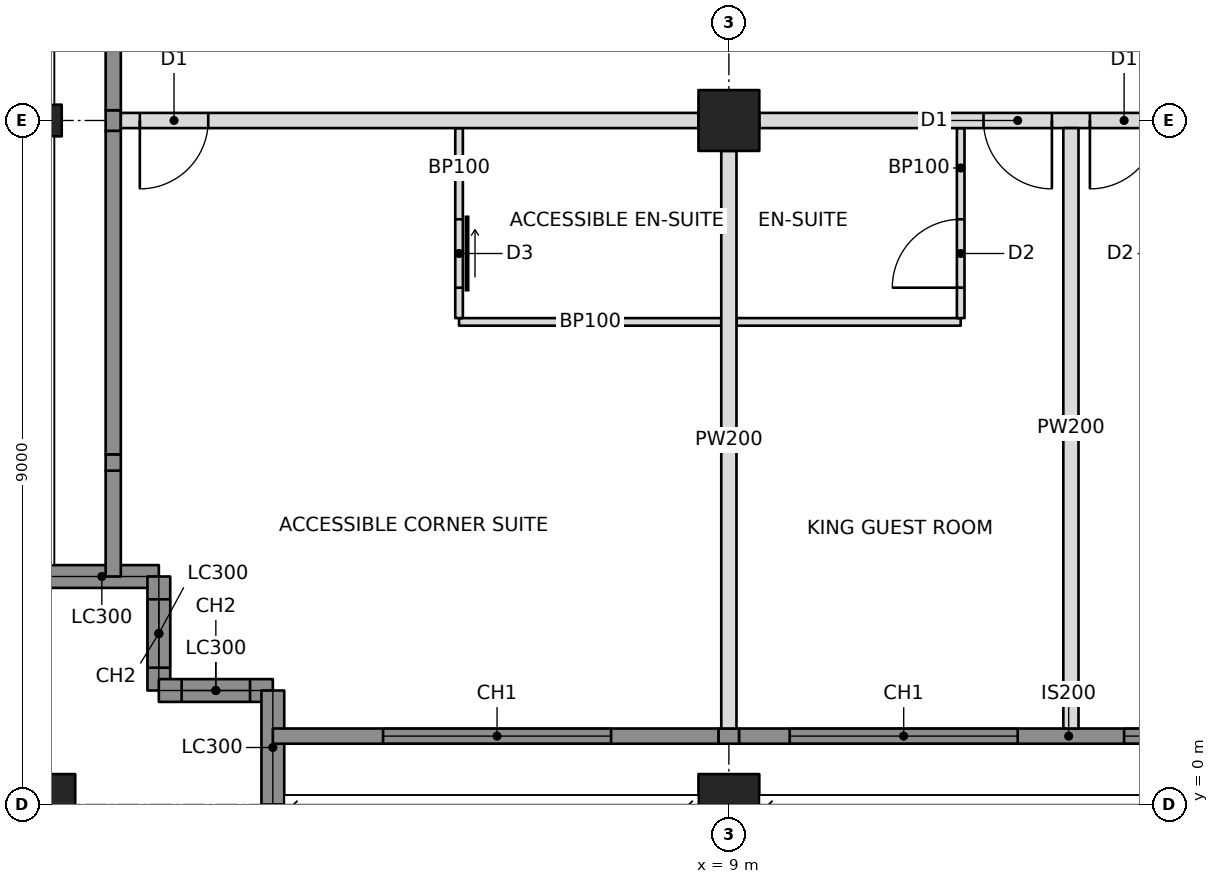
"""IFC4 building model, lengths in metres.
Left out: names, types, materials, properties, quantities, classifications, styles, units other than length and angle.
Written with IfcOpenShell. Run it as: python <this file> out.ifc"""

import sys

from ifc_helpers import new_model, si_unit, direction, frame, frame_2d, origin, origin_with_axes, origin_2d, place, context, subcontext, project, spatial, rectangle, hollow_rectangle, i_section, extrude, element, fill, save


model = new_model("IFC4")
c1 = context("Model", 3, precision=1e-05, world=origin(), true_north=direction((0.0, 1.0)))
c2 = subcontext(c1, "Body", "Model", "MODEL_VIEW")
j1 = project(units=[si_unit("LENGTHUNIT", "METRE"), si_unit("PLANEANGLEUNIT", "RADIAN")], contexts=[c1])
p1 = place(None, origin())
s1 = spatial("IfcSite", under=j1, at=p1, CompositionType="ELEMENT")
p2 = place(p1, origin())
s2 = spatial("IfcBuilding", under=s1, at=p2, CompositionType="ELEMENT")
p3 = place(p2, frame((0.0, 0.0, 251.8)))
s3 = spatial("IfcBuildingStorey", under=s2, at=p3, CompositionType="ELEMENT", Elevation=251.8)
p4 = place(p3, origin_with_axes())
e1 = element("IfcColumn", 1, at=p4, inside=s3, PredefinedType="COLUMN", context=c2, shape_type="SweptSolid", body=[
    extrude(hollow_rectangle(XDim=0.8, YDim=0.8, WallThickness=0.032, at=origin_2d()), origin(), (0.0, 0.0, 1.0), 3.6),
])
p5 = place(p3, frame((0.0, 9.0, 0.0), z_axis=(0.0, 0.0, 1.0), x_axis=(0.0, 1.0, 0.0)))
e2 = element("IfcColumn", 2, at=p5, inside=s3, PredefinedType="COLUMN", context=c2, shape_type="SweptSolid", body=[
    extrude(i_section(OverallWidth=0.417, OverallDepth=0.445, WebThickness=0.039, FlangeThickness=0.063, at=origin_2d()), origin(), (0.0, 0.0, 1.0), 3.6),
])
for number, where, z_axis, x_axis in (
    (3, (9.0, 0.0, 0.0), (0.0, 0.0, 1.0), (1.0, 0.0, 0.0)),
    (4, (9.0, 9.0, 0.0), (0.0, 0.0, 1.0), (1.0, 0.0, 0.0)),
):
    element("IfcColumn", number, at=place(p3, frame(where, z_axis=z_axis, x_axis=x_axis)), inside=s3, PredefinedType="COLUMN", context=c2, shape_type="SweptSolid", body=[
        extrude(hollow_rectangle(XDim=0.8, YDim=0.8, WallThickness=0.032, at=origin_2d()), origin(), (0.0, 0.0, 1.0), 3.6),
    ])
p6 = place(p3, frame((0.0, 3.0, 0.0), z_axis=(0.0, 0.0, 1.0), x_axis=(1.0, 0.0, 0.0)))
e5 = element("IfcWall", 5, at=p6, inside=s3, PredefinedType="SOLIDWALL", context=c2, shape_type="SweptSolid", body=[
    extrude(rectangle(XDim=1.5, YDim=0.3, at=frame_2d((0.75, 0.0))), origin(), (0.0, 0.0, 1.0), 2.62),
])
p7 = place(p3, frame((1.5, 3.0, 0.0), z_axis=(0.0, 0.0, 1.0), x_axis=(0.0, -1.0, 0.0)))
e6 = element("IfcWall", 6, at=p7, inside=s3, PredefinedType="SOLIDWALL", context=c2, shape_type="SweptSolid", body=[
    extrude(rectangle(XDim=1.5, YDim=0.3, at=frame_2d((0.75, 0.0))), origin(), (0.0, 0.0, 1.0), 3.4),
])
p8 = place(p7, frame((0.3, 0.0, 0.6)))
e7 = element("IfcOpeningElement", 7, at=p8, cuts=e6, PredefinedType="OPENING", context=c2, shape_type="SweptSolid", body=[
    extrude(rectangle(XDim=0.9, YDim=2.2, at=frame_2d((0.45, 1.1))), frame((0.0, 0.16, 0.0), z_axis=(0.0, -1.0, 0.0), x_axis=(1.0, 0.0, 0.0)), (0.0, 0.0, 1.0), 0.32),
])
p9 = place(p3, frame((1.5, 1.5, 0.0), z_axis=(0.0, 0.0, 1.0), x_axis=(1.0, 0.0, 0.0)))
e8 = element("IfcWall", 8, at=p9, inside=s3, PredefinedType="SOLIDWALL", context=c2, shape_type="SweptSolid", body=[
    extrude(rectangle(XDim=1.5, YDim=0.3, at=frame_2d((0.75, 0.0))), origin(), (0.0, 0.0, 1.0), 3.4),
])
p10 = place(p9, frame((0.3, 0.0, 0.6)))
e9 = element("IfcOpeningElement", 9, at=p10, cuts=e8, PredefinedType="OPENING", context=c2, shape_type="SweptSolid", body=[
    extrude(rectangle(XDim=0.9, YDim=2.2, at=frame_2d((0.45, 1.1))), frame((0.0, 0.16, 0.0), z_axis=(0.0, -1.0, 0.0), x_axis=(1.0, 0.0, 0.0)), (0.0, 0.0, 1.0), 0.32),
])
p11 = place(p3, frame((3.0, 1.5, 0.0), z_axis=(0.0, 0.0, 1.0), x_axis=(0.0, -1.0, 0.0)))
e10 = element("IfcWall", 10, at=p11, inside=s3, PredefinedType="SOLIDWALL", context=c2, shape_type="SweptSolid", body=[
    extrude(rectangle(XDim=1.5, YDim=0.3, at=frame_2d((0.75, 0.0))), origin(), (0.0, 0.0, 1.0), 2.62),
])
p12 = place(p3, frame((3.0, 0.9, 0.0), z_axis=(0.0, 0.0, 1.0), x_axis=(1.0, 0.0, 0.0)))
e11 = element("IfcWall", 11, at=p12, inside=s3, PredefinedType="SOLIDWALL", context=c2, shape_type="SweptSolid", body=[
    extrude(rectangle(XDim=5.865, YDim=0.2, at=frame_2d((2.932, 0.0))), origin(), (0.0, 0.0, 1.0), 3.4),
])
p13 = place(p12, frame((1.45, 0.0, 0.6)))
e12 = element("IfcOpeningElement", 12, at=p13, cuts=e11, PredefinedType="OPENING", context=c2, shape_type="SweptSolid", body=[
    extrude(rectangle(XDim=3.0, YDim=2.2, at=frame_2d((1.5, 1.1))), frame((0.0, 0.11, 0.0), z_axis=(0.0, -1.0, 0.0), x_axis=(1.0, 0.0, 0.0)), (0.0, 0.0, 1.0), 0.22),
])
p14 = place(p3, frame((0.9, 3.0, 0.0), z_axis=(0.0, 0.0, 1.0), x_axis=(0.0, 1.0, 0.0)))
e13 = element("IfcWall", 13, at=p14, inside=s3, PredefinedType="SOLIDWALL", context=c2, shape_type="SweptSolid", body=[
    extrude(rectangle(XDim=1.393, YDim=0.2, at=frame_2d((0.696, 0.0))), origin(), (0.0, 0.0, 1.0), 3.4),
])
p15 = place(p3, frame((1.0, 9.0, 0.0), z_axis=(0.0, 0.0, 1.0), x_axis=(1.0, 0.0, 0.0)))
e14 = element("IfcWall", 14, at=p15, inside=s3, PredefinedType="PARTITIONING", context=c2, shape_type="SweptSolid", body=[
    extrude(rectangle(XDim=7.6, YDim=0.2, at=frame_2d((3.8, 0.0))), origin(), (0.0, 0.0, 1.0), 2.638),
])
p16 = place(p15, frame((0.25, 0.0, 0.0)))
e15 = element("IfcOpeningElement", 15, at=p16, cuts=e14, PredefinedType="OPENING", context=c2, shape_type="SweptSolid", body=[
    extrude(rectangle(XDim=0.9, YDim=2.1, at=frame_2d((0.45, 1.05))), frame((0.0, 0.11, 0.0), z_axis=(0.0, -1.0, 0.0), x_axis=(1.0, 0.0, 0.0)), (0.0, 0.0, 1.0), 0.22),
])
p17 = place(p3, frame((9.4, 9.0, 0.0), z_axis=(0.0, 0.0, 1.0), x_axis=(1.0, 0.0, 0.0)))
e16 = element("IfcWall", 16, at=p17, inside=s3, PredefinedType="PARTITIONING", context=c2, shape_type="SweptSolid", body=[
    extrude(rectangle(XDim=8.2, YDim=0.2, at=frame_2d((4.1, 0.0))), origin(), (0.0, 0.0, 1.0), 2.605),
])
p18 = place(p17, frame((2.95, 0.0, 0.0)))
e17 = element("IfcOpeningElement", 17, at=p18, cuts=e16, PredefinedType="OPENING", context=c2, shape_type="SweptSolid", body=[
    extrude(rectangle(XDim=0.9, YDim=2.1, at=frame_2d((0.45, 1.05))), frame((0.0, 0.11, 0.0), z_axis=(0.0, -1.0, 0.0), x_axis=(1.0, 0.0, 0.0)), (0.0, 0.0, 1.0), 0.22),
])
p19 = place(p17, frame((4.35, 0.0, 0.0)))
e18 = element("IfcOpeningElement", 18, at=p19, cuts=e16, PredefinedType="OPENING", context=c2, shape_type="SweptSolid", body=[
    extrude(rectangle(XDim=0.9, YDim=2.1, at=frame_2d((0.45, 1.05))), frame((0.0, 0.11, 0.0), z_axis=(0.0, -1.0, 0.0), x_axis=(1.0, 0.0, 0.0)), (0.0, 0.0, 1.0), 0.22),
])
p20 = place(p3, frame((9.0, 8.6, 0.0), z_axis=(0.0, 0.0, 1.0), x_axis=(0.0, -1.0, 0.0)))
e19 = element("IfcWall", 19, at=p20, inside=s3, PredefinedType="PARTITIONING", context=c2, shape_type="SweptSolid", body=[
    extrude(rectangle(XDim=7.6, YDim=0.2, at=frame_2d((3.8, 0.0))), origin(), (0.0, 0.0, 1.0), 2.638),
])
p21 = place(p3, frame((13.5, 8.9, 0.0), z_axis=(0.0, 0.0, 1.0), x_axis=(0.0, -1.0, 0.0)))
e20 = element("IfcWall", 20, at=p21, inside=s3, PredefinedType="PARTITIONING", context=c2, shape_type="SweptSolid", body=[
    extrude(rectangle(XDim=7.9, YDim=0.2, at=frame_2d((3.95, 0.0))), origin(), (0.0, 0.0, 1.0), 2.604),
])
p22 = place(p3, frame((5.45, 6.35, 0.0), z_axis=(0.0, 0.0, 1.0), x_axis=(1.0, 0.0, 0.0)))
e21 = element("IfcWall", 21, at=p22, inside=s3, PredefinedType="PARTITIONING", context=c2, shape_type="SweptSolid", body=[
    extrude(rectangle(XDim=3.45, YDim=0.1, at=frame_2d((1.725, 0.0))), origin(), (0.0, 0.0, 1.0), 2.638),
])
p23 = place(p3, frame((5.45, 8.9, 0.0), z_axis=(0.0, 0.0, 1.0), x_axis=(0.0, -1.0, 0.0)))
e22 = element("IfcWall", 22, at=p23, inside=s3, PredefinedType="PARTITIONING", context=c2, shape_type="SweptSolid", body=[
    extrude(rectangle(XDim=2.5, YDim=0.1, at=frame_2d((1.25, 0.0))), origin(), (0.0, 0.0, 1.0), 2.638),
])
p24 = place(p23, frame((1.2, 0.0, 0.0)))
e23 = element("IfcOpeningElement", 23, at=p24, cuts=e22, PredefinedType="OPENING", context=c2, shape_type="SweptSolid", body=[
    extrude(rectangle(XDim=0.9, YDim=2.1, at=frame_2d((0.45, 1.05))), frame((0.0, 0.06, 0.0), z_axis=(0.0, -1.0, 0.0), x_axis=(1.0, 0.0, 0.0)), (0.0, 0.0, 1.0), 0.12),
])
p25 = place(p3, frame((9.1, 6.35, 0.0), z_axis=(0.0, 0.0, 1.0), x_axis=(1.0, 0.0, 0.0)))
e24 = element("IfcWall", 24, at=p25, inside=s3, PredefinedType="PARTITIONING", context=c2, shape_type="SweptSolid", body=[
    extrude(rectangle(XDim=2.95, YDim=0.1, at=frame_2d((1.475, 0.0))), origin(), (0.0, 0.0, 1.0), 2.638),
])
p26 = place(p3, frame((12.05, 8.9, 0.0), z_axis=(0.0, 0.0, 1.0), x_axis=(0.0, -1.0, 0.0)))
e25 = element("IfcWall", 25, at=p26, inside=s3, PredefinedType="PARTITIONING", context=c2, shape_type="SweptSolid", body=[
    extrude(rectangle(XDim=2.5, YDim=0.1, at=frame_2d((1.25, 0.0))), origin(), (0.0, 0.0, 1.0), 2.604),
])
p27 = place(p26, frame((1.2, 0.0, 0.0)))
e26 = element("IfcOpeningElement", 26, at=p27, cuts=e25, PredefinedType="OPENING", context=c2, shape_type="SweptSolid", body=[
    extrude(rectangle(XDim=0.9, YDim=2.1, at=frame_2d((0.45, 1.05))), frame((0.0, 0.06, 0.0), z_axis=(0.0, -1.0, 0.0), x_axis=(1.0, 0.0, 0.0)), (0.0, 0.0, 1.0), 0.12),
])
p28 = place(p3, frame((8.865, 0.9, 0.0), z_axis=(0.0, 0.0, 1.0), x_axis=(1.0, 0.0, 0.0)))
e27 = element("IfcWall", 27, at=p28, inside=s3, PredefinedType="SOLIDWALL", context=c2, shape_type="SweptSolid", body=[
    extrude(rectangle(XDim=0.271, YDim=0.2, at=frame_2d((0.135, 0.0))), origin(), (0.0, 0.0, 1.0), 2.638),
])
p29 = place(p3, frame((9.135, 0.9, 0.0), z_axis=(0.0, 0.0, 1.0), x_axis=(1.0, 0.0, 0.0)))
e28 = element("IfcWall", 28, at=p29, inside=s3, PredefinedType="SOLIDWALL", context=c2, shape_type="SweptSolid", body=[
    extrude(rectangle(XDim=8.671, YDim=0.2, at=frame_2d((4.335, 0.0))), origin(), (0.0, 0.0, 1.0), 3.4),
])
p30 = place(p29, frame((0.665, 0.0, 0.6)))
e29 = element("IfcOpeningElement", 29, at=p30, cuts=e28, PredefinedType="OPENING", context=c2, shape_type="SweptSolid", body=[
    extrude(rectangle(XDim=3.0, YDim=2.2, at=frame_2d((1.5, 1.1))), frame((0.0, 0.11, 0.0), z_axis=(0.0, -1.0, 0.0), x_axis=(1.0, 0.0, 0.0)), (0.0, 0.0, 1.0), 0.22),
])
p31 = place(p29, frame((5.065, 0.0, 0.6)))
e30 = element("IfcOpeningElement", 30, at=p31, cuts=e28, PredefinedType="OPENING", context=c2, shape_type="SweptSolid", body=[
    extrude(rectangle(XDim=3.0, YDim=2.2, at=frame_2d((1.5, 1.1))), frame((0.0, 0.11, 0.0), z_axis=(0.0, -1.0, 0.0), x_axis=(1.0, 0.0, 0.0)), (0.0, 0.0, 1.0), 0.22),
])
p32 = place(p3, frame((0.9, 4.393, 0.0), z_axis=(0.0, 0.0, 1.0), x_axis=(0.0, 1.0, 0.0)))
e31 = element("IfcWall", 31, at=p32, inside=s3, PredefinedType="SOLIDWALL", context=c2, shape_type="SweptSolid", body=[
    extrude(rectangle(XDim=0.215, YDim=0.2, at=frame_2d((0.107, 0.0))), origin(), (0.0, 0.0, 1.0), 2.861),
])
p33 = place(p3, frame((0.9, 4.607, 0.0), z_axis=(0.0, 0.0, 1.0), x_axis=(0.0, 1.0, 0.0)))
e32 = element("IfcWall", 32, at=p33, inside=s3, PredefinedType="SOLIDWALL", context=c2, shape_type="SweptSolid", body=[
    extrude(rectangle(XDim=4.257, YDim=0.2, at=frame_2d((2.129, 0.0))), origin(), (0.0, 0.0, 1.0), 3.4),
])
p34 = place(p3, frame((0.9, 8.865, 0.0), z_axis=(0.0, 0.0, 1.0), x_axis=(0.0, 1.0, 0.0)))
e33 = element("IfcWall", 33, at=p34, inside=s3, PredefinedType="SOLIDWALL", context=c2, shape_type="SweptSolid", body=[
    extrude(rectangle(XDim=0.271, YDim=0.2, at=frame_2d((0.135, 0.0))), origin(), (0.0, 0.0, 1.0), 2.638),
])
p35 = place(p3, frame((0.9, 9.135, 0.0), z_axis=(0.0, 0.0, 1.0), x_axis=(0.0, 1.0, 0.0)))
e34 = element("IfcWall", 34, at=p35, inside=s3, PredefinedType="SOLIDWALL", context=c2, shape_type="SweptSolid", body=[
    extrude(rectangle(XDim=8.671, YDim=0.2, at=frame_2d((4.335, 0.0))), origin(), (0.0, 0.0, 1.0), 3.4),
])
p36 = place(p35, frame((2.015, 0.0, 0.6)))
e35 = element("IfcOpeningElement", 35, at=p36, cuts=e34, PredefinedType="OPENING", context=c2, shape_type="SweptSolid", body=[
    extrude(rectangle(XDim=3.0, YDim=2.2, at=frame_2d((1.5, 1.1))), frame((0.0, 0.11, 0.0), z_axis=(0.0, -1.0, 0.0), x_axis=(1.0, 0.0, 0.0)), (0.0, 0.0, 1.0), 0.22),
])
p37 = place(p35, frame((5.515, 0.0, 0.6)))
e36 = element("IfcOpeningElement", 36, at=p37, cuts=e34, PredefinedType="OPENING", context=c2, shape_type="SweptSolid", body=[
    extrude(rectangle(XDim=3.0, YDim=2.2, at=frame_2d((1.5, 1.1))), frame((0.0, 0.11, 0.0), z_axis=(0.0, -1.0, 0.0), x_axis=(1.0, 0.0, 0.0)), (0.0, 0.0, 1.0), 0.22),
])
p38 = place(p8, origin())
e37 = element("IfcWindow", 37, at=p38, inside=s3, PartitioningType="SINGLE_PANEL", PredefinedType="WINDOW", context=c2, shape_type="SweptSolid", body=[
    extrude(rectangle(XDim=0.9, YDim=2.2, at=frame_2d((0.45, 1.1))), frame((0.0, 0.03, 0.0), z_axis=(0.0, -1.0, 0.0), x_axis=(1.0, 0.0, 0.0)), (0.0, 0.0, 1.0), 0.06),
])
fill(e7, e37)
p39 = place(p10, origin())
e38 = element("IfcWindow", 38, at=p39, inside=s3, PartitioningType="SINGLE_PANEL", PredefinedType="WINDOW", context=c2, shape_type="SweptSolid", body=[
    extrude(rectangle(XDim=0.9, YDim=2.2, at=frame_2d((0.45, 1.1))), frame((0.0, 0.03, 0.0), z_axis=(0.0, -1.0, 0.0), x_axis=(1.0, 0.0, 0.0)), (0.0, 0.0, 1.0), 0.06),
])
fill(e9, e38)
p40 = place(p13, origin())
e39 = element("IfcWindow", 39, at=p40, inside=s3, PartitioningType="TRIPLE_PANEL_VERTICAL", PredefinedType="WINDOW", context=c2, shape_type="SweptSolid", body=[
    extrude(rectangle(XDim=3.0, YDim=2.2, at=frame_2d((1.5, 1.1))), frame((0.0, 0.03, 0.0), z_axis=(0.0, -1.0, 0.0), x_axis=(1.0, 0.0, 0.0)), (0.0, 0.0, 1.0), 0.06),
])
fill(e12, e39)
p41 = place(p30, origin())
e40 = element("IfcWindow", 40, at=p41, inside=s3, PartitioningType="TRIPLE_PANEL_VERTICAL", PredefinedType="WINDOW", context=c2, shape_type="SweptSolid", body=[
    extrude(rectangle(XDim=3.0, YDim=2.2, at=frame_2d((1.5, 1.1))), frame((0.0, 0.03, 0.0), z_axis=(0.0, -1.0, 0.0), x_axis=(1.0, 0.0, 0.0)), (0.0, 0.0, 1.0), 0.06),
])
fill(e29, e40)
p42 = place(p31, origin())
e41 = element("IfcWindow", 41, at=p42, inside=s3, PartitioningType="TRIPLE_PANEL_VERTICAL", PredefinedType="WINDOW", context=c2, shape_type="SweptSolid", body=[
    extrude(rectangle(XDim=3.0, YDim=2.2, at=frame_2d((1.5, 1.1))), frame((0.0, 0.03, 0.0), z_axis=(0.0, -1.0, 0.0), x_axis=(1.0, 0.0, 0.0)), (0.0, 0.0, 1.0), 0.06),
])
fill(e30, e41)
p43 = place(p24, origin())
e42 = element("IfcDoor", 42, at=p43, inside=s3, OperationType="SLIDING_TO_LEFT", PredefinedType="DOOR", context=c2, shape_type="SweptSolid", body=[
    extrude(rectangle(XDim=0.9, YDim=2.1, at=frame_2d((0.45, 1.05))), frame((0.0, 0.025, 0.0), z_axis=(0.0, -1.0, 0.0), x_axis=(1.0, 0.0, 0.0)), (0.0, 0.0, 1.0), 0.05),
])
fill(e23, e42)
p44 = place(p16, frame((0.9, 0.0, 0.0), z_axis=(0.0, 0.0, 1.0), x_axis=(-1.0, 0.0, 0.0)))
e43 = element("IfcDoor", 43, at=p44, inside=s3, OperationType="SINGLE_SWING_RIGHT", PredefinedType="DOOR", context=c2, shape_type="SweptSolid", body=[
    extrude(rectangle(XDim=0.9, YDim=2.1, at=frame_2d((0.45, 1.05))), frame((0.0, 0.025, 0.0), z_axis=(0.0, -1.0, 0.0), x_axis=(1.0, 0.0, 0.0)), (0.0, 0.0, 1.0), 0.05),
])
fill(e15, e43)
p45 = place(p27, frame((0.9, 0.0, 0.0), z_axis=(0.0, 0.0, 1.0), x_axis=(-1.0, 0.0, 0.0)))
e44 = element("IfcDoor", 44, at=p45, inside=s3, OperationType="SINGLE_SWING_LEFT", PredefinedType="DOOR", context=c2, shape_type="SweptSolid", body=[
    extrude(rectangle(XDim=0.9, YDim=2.1, at=frame_2d((0.45, 1.05))), frame((0.0, 0.025, 0.0), z_axis=(0.0, -1.0, 0.0), x_axis=(1.0, 0.0, 0.0)), (0.0, 0.0, 1.0), 0.05),
])
fill(e26, e44)
p46 = place(p18, frame((0.9, 0.0, 0.0), z_axis=(0.0, 0.0, 1.0), x_axis=(-1.0, 0.0, 0.0)))
e45 = element("IfcDoor", 45, at=p46, inside=s3, OperationType="SINGLE_SWING_LEFT", PredefinedType="DOOR", context=c2, shape_type="SweptSolid", body=[
    extrude(rectangle(XDim=0.9, YDim=2.1, at=frame_2d((0.45, 1.05))), frame((0.0, 0.025, 0.0), z_axis=(0.0, -1.0, 0.0), x_axis=(1.0, 0.0, 0.0)), (0.0, 0.0, 1.0), 0.05),
])
fill(e17, e45)
p47 = place(p19, frame((0.9, 0.0, 0.0), z_axis=(0.0, 0.0, 1.0), x_axis=(-1.0, 0.0, 0.0)))
e46 = element("IfcDoor", 46, at=p47, inside=s3, OperationType="SINGLE_SWING_RIGHT", PredefinedType="DOOR", context=c2, shape_type="SweptSolid", body=[
    extrude(rectangle(XDim=0.9, YDim=2.1, at=frame_2d((0.45, 1.05))), frame((0.0, 0.025, 0.0), z_axis=(0.0, -1.0, 0.0), x_axis=(1.0, 0.0, 0.0)), (0.0, 0.0, 1.0), 0.05),
])
fill(e18, e46)
save(model, sys.argv[1])
